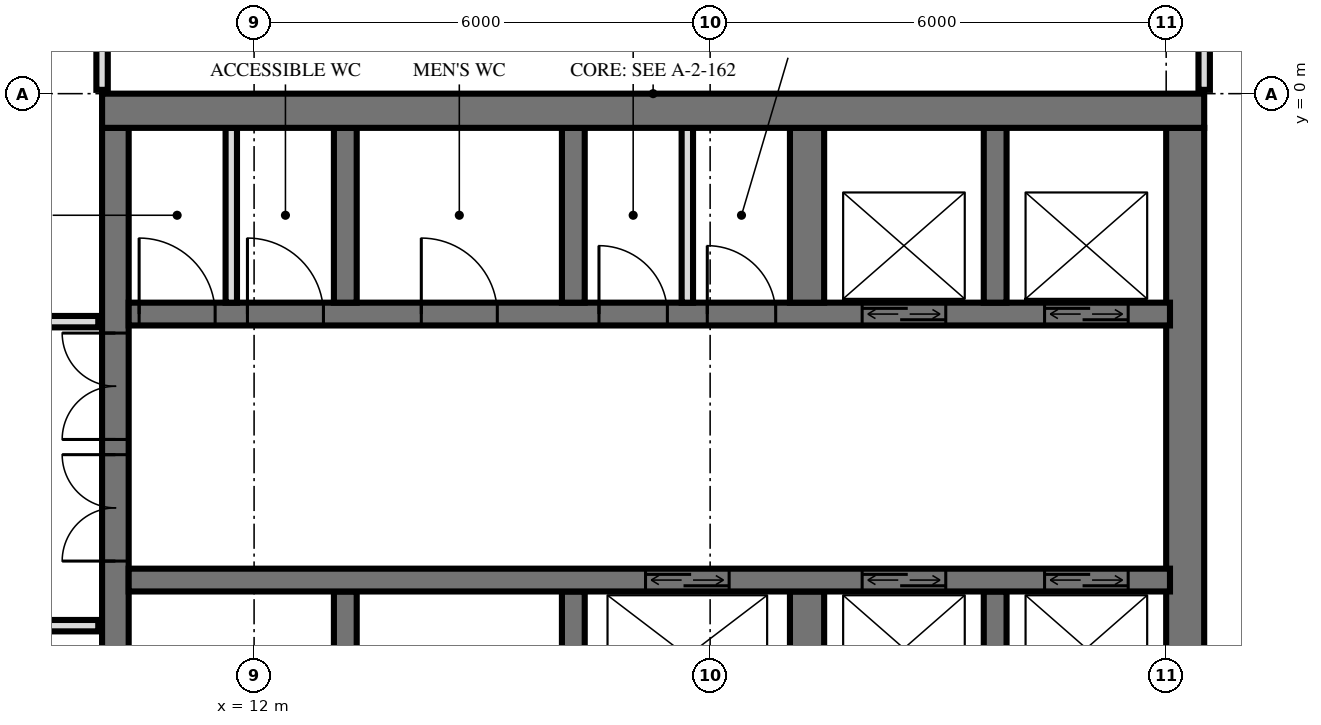
"""IFC4 building model, lengths in metres.
Left out: names, types, materials, properties, quantities, classifications, styles, units other than length and angle.
Written with IfcOpenShell. Run it as: python <this file> out.ifc"""

import sys

from ifc_helpers import new_model, si_unit, direction, frame, frame_2d, origin, place, context, subcontext, project, spatial, rectangle, extrude, element, fill, save


model = new_model("IFC4")
c1 = context("Model", 3, precision=1e-05, world=origin(), true_north=direction((0.0, 1.0)))
c2 = subcontext(c1, "Body", "Model", "MODEL_VIEW")
j1 = project(units=[si_unit("LENGTHUNIT", "METRE"), si_unit("PLANEANGLEUNIT", "RADIAN")], contexts=[c1])
p1 = place(None, origin())
s1 = spatial("IfcSite", under=j1, at=p1, CompositionType="ELEMENT")
p2 = place(p1, origin())
s2 = spatial("IfcBuilding", under=s1, at=p2, CompositionType="ELEMENT")
p3 = place(p2, frame((0.0, 0.0, 106.8)))
s3 = spatial("IfcBuildingStorey", under=s2, at=p3, CompositionType="ELEMENT", Elevation=106.8)
p4 = place(p3, frame((10.0, -0.225, 0.0), z_axis=(0.0, 0.0, 1.0), x_axis=(1.0, 0.0, 0.0)))
e1 = element("IfcWall", 1, at=p4, inside=s3, PredefinedType="SHEAR", context=c2, shape_type="SweptSolid", body=[
    extrude(rectangle(XDim=14.5, YDim=0.45, at=frame_2d((7.25, 0.0))), origin(), (0.0, 0.0, 1.0), 6.0),
])
p5 = place(p3, frame((10.175, -14.55, 0.0), z_axis=(0.0, 0.0, 1.0), x_axis=(0.0, 1.0, 0.0)))
e2 = element("IfcWall", 2, at=p5, inside=s3, PredefinedType="SHEAR", context=c2, shape_type="SweptSolid", body=[
    extrude(rectangle(XDim=14.1, YDim=0.35, at=frame_2d((7.05, 0.0))), origin(), (0.0, 0.0, 1.0), 6.0),
])
p6 = place(p5, frame((8.4, 0.0, 0.0)))
e3 = element("IfcOpeningElement", 3, at=p6, cuts=e2, PredefinedType="OPENING", context=c2, shape_type="SweptSolid", body=[
    extrude(rectangle(XDim=1.4, YDim=2.4, at=frame_2d((0.7, 1.2))), frame((0.0, 0.185, 0.0), z_axis=(0.0, -1.0, 0.0), x_axis=(1.0, 0.0, 0.0)), (0.0, 0.0, 1.0), 0.37),
])
p7 = place(p5, frame((10.0, 0.0, 0.0)))
e4 = element("IfcOpeningElement", 4, at=p7, cuts=e2, PredefinedType="OPENING", context=c2, shape_type="SweptSolid", body=[
    extrude(rectangle(XDim=1.4, YDim=2.4, at=frame_2d((0.7, 1.2))), frame((0.0, 0.185, 0.0), z_axis=(0.0, -1.0, 0.0), x_axis=(1.0, 0.0, 0.0)), (0.0, 0.0, 1.0), 0.37),
])
p8 = place(p5, frame((4.0, 0.0, 0.0)))
e5 = element("IfcOpeningElement", 5, at=p8, cuts=e2, PredefinedType="OPENING", context=c2, shape_type="SweptSolid", body=[
    extrude(rectangle(XDim=1.2, YDim=2.1, at=frame_2d((0.6, 1.05))), frame((0.0, 0.185, 0.0), z_axis=(0.0, -1.0, 0.0), x_axis=(1.0, 0.0, 0.0)), (0.0, 0.0, 1.0), 0.37),
])
p9 = place(p3, frame((24.25, -14.55, 0.0), z_axis=(0.0, 0.0, 1.0), x_axis=(0.0, 1.0, 0.0)))
e6 = element("IfcWall", 6, at=p9, inside=s3, PredefinedType="SHEAR", context=c2, shape_type="SweptSolid", body=[
    extrude(rectangle(XDim=14.1, YDim=0.5, at=frame_2d((7.05, 0.0))), origin(), (0.0, 0.0, 1.0), 6.0),
])
p10 = place(p3, frame((10.35, -2.9, 0.0), z_axis=(0.0, 0.0, 1.0), x_axis=(1.0, 0.0, 0.0)))
e7 = element("IfcWall", 7, at=p10, inside=s3, PredefinedType="SHEAR", context=c2, shape_type="SweptSolid", body=[
    extrude(rectangle(XDim=13.7, YDim=0.3, at=frame_2d((6.85, 0.0))), origin(), (0.0, 0.0, 1.0), 6.0),
])
p11 = place(p10, frame((9.65, 0.0, 0.0)))
e8 = element("IfcOpeningElement", 8, at=p11, cuts=e7, PredefinedType="OPENING", context=c2, shape_type="SweptSolid", body=[
    extrude(rectangle(XDim=1.1, YDim=2.1, at=frame_2d((0.55, 1.05))), frame((0.0, 0.16, 0.0), z_axis=(0.0, -1.0, 0.0), x_axis=(1.0, 0.0, 0.0)), (0.0, 0.0, 1.0), 0.32),
])
p12 = place(p10, frame((12.05, 0.0, 0.0)))
e9 = element("IfcOpeningElement", 9, at=p12, cuts=e7, PredefinedType="OPENING", context=c2, shape_type="SweptSolid", body=[
    extrude(rectangle(XDim=1.1, YDim=2.1, at=frame_2d((0.55, 1.05))), frame((0.0, 0.16, 0.0), z_axis=(0.0, -1.0, 0.0), x_axis=(1.0, 0.0, 0.0)), (0.0, 0.0, 1.0), 0.32),
])
p13 = place(p10, frame((6.188, 0.0, 0.0)))
e10 = element("IfcOpeningElement", 10, at=p13, cuts=e7, PredefinedType="OPENING", context=c2, shape_type="SweptSolid", body=[
    extrude(rectangle(XDim=0.9, YDim=2.1, at=frame_2d((0.45, 1.05))), frame((0.0, 0.16, 0.0), z_axis=(0.0, -1.0, 0.0), x_axis=(1.0, 0.0, 0.0)), (0.0, 0.0, 1.0), 0.32),
])
p14 = place(p10, frame((7.613, 0.0, 0.0)))
e11 = element("IfcOpeningElement", 11, at=p14, cuts=e7, PredefinedType="OPENING", context=c2, shape_type="SweptSolid", body=[
    extrude(rectangle(XDim=0.9, YDim=2.1, at=frame_2d((0.45, 1.05))), frame((0.0, 0.16, 0.0), z_axis=(0.0, -1.0, 0.0), x_axis=(1.0, 0.0, 0.0)), (0.0, 0.0, 1.0), 0.32),
])
p15 = place(p10, frame((0.137, 0.0, 0.0)))
e12 = element("IfcOpeningElement", 12, at=p15, cuts=e7, PredefinedType="OPENING", context=c2, shape_type="SweptSolid", body=[
    extrude(rectangle(XDim=1.0, YDim=2.1, at=frame_2d((0.5, 1.05))), frame((0.0, 0.16, 0.0), z_axis=(0.0, -1.0, 0.0), x_axis=(1.0, 0.0, 0.0)), (0.0, 0.0, 1.0), 0.32),
])
p16 = place(p10, frame((1.562, 0.0, 0.0)))
e13 = element("IfcOpeningElement", 13, at=p16, cuts=e7, PredefinedType="OPENING", context=c2, shape_type="SweptSolid", body=[
    extrude(rectangle(XDim=1.0, YDim=2.1, at=frame_2d((0.5, 1.05))), frame((0.0, 0.16, 0.0), z_axis=(0.0, -1.0, 0.0), x_axis=(1.0, 0.0, 0.0)), (0.0, 0.0, 1.0), 0.32),
])
p17 = place(p10, frame((3.85, 0.0, 0.0)))
e14 = element("IfcOpeningElement", 14, at=p17, cuts=e7, PredefinedType="OPENING", context=c2, shape_type="SweptSolid", body=[
    extrude(rectangle(XDim=1.0, YDim=2.1, at=frame_2d((0.5, 1.05))), frame((0.0, 0.16, 0.0), z_axis=(0.0, -1.0, 0.0), x_axis=(1.0, 0.0, 0.0)), (0.0, 0.0, 1.0), 0.32),
])
p18 = place(p3, frame((10.35, -6.4, 0.0), z_axis=(0.0, 0.0, 1.0), x_axis=(1.0, 0.0, 0.0)))
e15 = element("IfcWall", 15, at=p18, inside=s3, PredefinedType="SHEAR", context=c2, shape_type="SweptSolid", body=[
    extrude(rectangle(XDim=13.7, YDim=0.3, at=frame_2d((6.85, 0.0))), origin(), (0.0, 0.0, 1.0), 6.0),
])
p19 = place(p18, frame((9.65, 0.0, 0.0)))
e16 = element("IfcOpeningElement", 16, at=p19, cuts=e15, PredefinedType="OPENING", context=c2, shape_type="SweptSolid", body=[
    extrude(rectangle(XDim=1.1, YDim=2.1, at=frame_2d((0.55, 1.05))), frame((0.0, 0.16, 0.0), z_axis=(0.0, -1.0, 0.0), x_axis=(1.0, 0.0, 0.0)), (0.0, 0.0, 1.0), 0.32),
])
p20 = place(p18, frame((12.05, 0.0, 0.0)))
e17 = element("IfcOpeningElement", 17, at=p20, cuts=e15, PredefinedType="OPENING", context=c2, shape_type="SweptSolid", body=[
    extrude(rectangle(XDim=1.1, YDim=2.1, at=frame_2d((0.55, 1.05))), frame((0.0, 0.16, 0.0), z_axis=(0.0, -1.0, 0.0), x_axis=(1.0, 0.0, 0.0)), (0.0, 0.0, 1.0), 0.32),
])
p21 = place(p18, frame((6.8, 0.0, 0.0)))
e18 = element("IfcOpeningElement", 18, at=p21, cuts=e15, PredefinedType="OPENING", context=c2, shape_type="SweptSolid", body=[
    extrude(rectangle(XDim=1.1, YDim=2.1, at=frame_2d((0.55, 1.05))), frame((0.0, 0.16, 0.0), z_axis=(0.0, -1.0, 0.0), x_axis=(1.0, 0.0, 0.0)), (0.0, 0.0, 1.0), 0.32),
])
for number, where, z_axis, x_axis in (
    (19, (13.2, -2.75, 0.0), (0.0, 0.0, 1.0), (0.0, 1.0, 0.0)),
    (20, (13.2, -8.85, 0.0), (0.0, 0.0, 1.0), (0.0, 1.0, 0.0)),
    (21, (16.2, -2.75, 0.0), (0.0, 0.0, 1.0), (0.0, 1.0, 0.0)),
    (22, (16.2, -8.85, 0.0), (0.0, 0.0, 1.0), (0.0, 1.0, 0.0)),
):
    element("IfcWall", number, at=place(p3, frame(where, z_axis=z_axis, x_axis=x_axis)), inside=s3, PredefinedType="SHEAR", context=c2, shape_type="SweptSolid", body=[
        extrude(rectangle(XDim=2.3, YDim=0.3, at=frame_2d((1.15, 0.0))), origin(), (0.0, 0.0, 1.0), 6.0),
    ])
for number, where, z_axis, x_axis in (
    (23, (19.275, -2.75, 0.0), (0.0, 0.0, 1.0), (0.0, 1.0, 0.0)),
    (24, (19.275, -8.85, 0.0), (0.0, 0.0, 1.0), (0.0, 1.0, 0.0)),
):
    element("IfcWall", number, at=place(p3, frame(where, z_axis=z_axis, x_axis=x_axis)), inside=s3, PredefinedType="SHEAR", context=c2, shape_type="SweptSolid", body=[
        extrude(rectangle(XDim=2.3, YDim=0.45, at=frame_2d((1.15, 0.0))), origin(), (0.0, 0.0, 1.0), 6.0),
    ])
for number, where, z_axis, x_axis in (
    (25, (21.75, -2.75, 0.0), (0.0, 0.0, 1.0), (0.0, 1.0, 0.0)),
    (26, (21.75, -8.85, 0.0), (0.0, 0.0, 1.0), (0.0, 1.0, 0.0)),
):
    element("IfcWall", number, at=place(p3, frame(where, z_axis=z_axis, x_axis=x_axis)), inside=s3, PredefinedType="SHEAR", context=c2, shape_type="SweptSolid", body=[
        extrude(rectangle(XDim=2.3, YDim=0.3, at=frame_2d((1.15, 0.0))), origin(), (0.0, 0.0, 1.0), 6.0),
    ])
for number, where, z_axis, x_axis in (
    (27, (17.7, -2.75, 0.0), (0.0, 0.0, 1.0), (0.0, 1.0, 0.0)),
    (28, (11.7, -2.75, 0.0), (0.0, 0.0, 1.0), (0.0, 1.0, 0.0)),
):
    element("IfcWall", number, at=place(p3, frame(where, z_axis=z_axis, x_axis=x_axis)), inside=s3, PredefinedType="PARTITIONING", context=c2, shape_type="SweptSolid", body=[
        extrude(rectangle(XDim=2.3, YDim=0.15, at=frame_2d((1.15, 0.0))), origin(), (0.0, 0.0, 1.0), 5.7),
    ])
p22 = place(p3, frame((24.5, 0.05, 0.0), z_axis=(0.0, 0.0, 1.0), x_axis=(0.0, 1.0, 0.0)))
e29 = element("IfcWall", 29, at=p22, inside=s3, PredefinedType="PARTITIONING", context=c2, shape_type="SweptSolid", body=[
    extrude(rectangle(XDim=0.807, YDim=0.15, at=frame_2d((0.404, 0.0))), origin(), (0.0, 0.0, 1.0), 5.7),
])
p23 = place(p3, frame((10.0, 0.05, 0.0), z_axis=(0.0, 0.0, 1.0), x_axis=(0.0, 1.0, 0.0)))
e30 = element("IfcWall", 30, at=p23, inside=s3, PredefinedType="PARTITIONING", context=c2, shape_type="SweptSolid", body=[
    extrude(rectangle(XDim=0.91, YDim=0.15, at=frame_2d((0.455, 0.0))), origin(), (0.0, 0.0, 1.0), 5.7),
])
p24 = place(p3, frame((-9.95, -7.0, 0.0), z_axis=(0.0, 0.0, 1.0), x_axis=(1.0, 0.0, 0.0)))
e31 = element("IfcWall", 31, at=p24, inside=s3, PredefinedType="PARTITIONING", context=c2, shape_type="SweptSolid", body=[
    extrude(rectangle(XDim=19.9, YDim=0.15, at=frame_2d((9.95, 0.0))), origin(), (0.0, 0.0, 1.0), 5.7),
])
p25 = place(p24, frame((9.45, 0.0, 0.0)))
e32 = element("IfcOpeningElement", 32, at=p25, cuts=e31, PredefinedType="OPENING", context=c2, shape_type="SweptSolid", body=[
    extrude(rectangle(XDim=1.0, YDim=2.1, at=frame_2d((0.5, 1.05))), frame((0.0, 0.085, 0.0), z_axis=(0.0, -1.0, 0.0), x_axis=(1.0, 0.0, 0.0)), (0.0, 0.0, 1.0), 0.17),
])
p26 = place(p24, frame((2.0, 0.0, 0.0)))
e33 = element("IfcOpeningElement", 33, at=p26, cuts=e31, PredefinedType="OPENING", context=c2, shape_type="SweptSolid", body=[
    extrude(rectangle(XDim=1.0, YDim=2.1, at=frame_2d((0.5, 1.05))), frame((0.0, 0.085, 0.0), z_axis=(0.0, -1.0, 0.0), x_axis=(1.0, 0.0, 0.0)), (0.0, 0.0, 1.0), 0.17),
])
p27 = place(p3, frame((-9.95, -3.0, 0.0), z_axis=(0.0, 0.0, 1.0), x_axis=(1.0, 0.0, 0.0)))
e34 = element("IfcWall", 34, at=p27, inside=s3, PredefinedType="PARTITIONING", context=c2, shape_type="SweptSolid", body=[
    extrude(rectangle(XDim=19.9, YDim=0.15, at=frame_2d((9.95, 0.0))), origin(), (0.0, 0.0, 1.0), 5.7),
])
p28 = place(p27, frame((0.95, 0.0, 0.0)))
e35 = element("IfcOpeningElement", 35, at=p28, cuts=e34, PredefinedType="OPENING", context=c2, shape_type="SweptSolid", body=[
    extrude(rectangle(XDim=1.0, YDim=2.1, at=frame_2d((0.5, 1.05))), frame((0.0, 0.085, 0.0), z_axis=(0.0, -1.0, 0.0), x_axis=(1.0, 0.0, 0.0)), (0.0, 0.0, 1.0), 0.17),
])
p29 = place(p27, frame((3.7, 0.0, 0.0)))
e36 = element("IfcOpeningElement", 36, at=p29, cuts=e34, PredefinedType="OPENING", context=c2, shape_type="SweptSolid", body=[
    extrude(rectangle(XDim=1.0, YDim=2.1, at=frame_2d((0.5, 1.05))), frame((0.0, 0.085, 0.0), z_axis=(0.0, -1.0, 0.0), x_axis=(1.0, 0.0, 0.0)), (0.0, 0.0, 1.0), 0.17),
])
p30 = place(p27, frame((7.0, 0.0, 0.0)))
e37 = element("IfcOpeningElement", 37, at=p30, cuts=e34, PredefinedType="OPENING", context=c2, shape_type="SweptSolid", body=[
    extrude(rectangle(XDim=1.0, YDim=2.1, at=frame_2d((0.5, 1.05))), frame((0.0, 0.085, 0.0), z_axis=(0.0, -1.0, 0.0), x_axis=(1.0, 0.0, 0.0)), (0.0, 0.0, 1.0), 0.17),
])
p31 = place(p27, frame((16.9, 0.0, 0.0)))
e38 = element("IfcOpeningElement", 38, at=p31, cuts=e34, PredefinedType="OPENING", context=c2, shape_type="SweptSolid", body=[
    extrude(rectangle(XDim=1.0, YDim=2.1, at=frame_2d((0.5, 1.05))), frame((0.0, 0.085, 0.0), z_axis=(0.0, -1.0, 0.0), x_axis=(1.0, 0.0, 0.0)), (0.0, 0.0, 1.0), 0.17),
])
p32 = place(p11, origin())
e39 = element("IfcDoor", 39, at=p32, inside=s3, OperationType="DOUBLE_DOOR_SLIDING", PredefinedType="USERDEFINED", context=c2, shape_type="SweptSolid", body=[
    extrude(rectangle(XDim=1.1, YDim=2.1, at=frame_2d((0.55, 1.05))), frame((0.0, 0.025, 0.0), z_axis=(0.0, -1.0, 0.0), x_axis=(1.0, 0.0, 0.0)), (0.0, 0.0, 1.0), 0.05),
])
fill(e8, e39)
p33 = place(p19, origin())
e40 = element("IfcDoor", 40, at=p33, inside=s3, OperationType="DOUBLE_DOOR_SLIDING", PredefinedType="USERDEFINED", context=c2, shape_type="SweptSolid", body=[
    extrude(rectangle(XDim=1.1, YDim=2.1, at=frame_2d((0.55, 1.05))), frame((0.0, 0.025, 0.0), z_axis=(0.0, -1.0, 0.0), x_axis=(1.0, 0.0, 0.0)), (0.0, 0.0, 1.0), 0.05),
])
fill(e16, e40)
p34 = place(p12, origin())
e41 = element("IfcDoor", 41, at=p34, inside=s3, OperationType="DOUBLE_DOOR_SLIDING", PredefinedType="USERDEFINED", context=c2, shape_type="SweptSolid", body=[
    extrude(rectangle(XDim=1.1, YDim=2.1, at=frame_2d((0.55, 1.05))), frame((0.0, 0.025, 0.0), z_axis=(0.0, -1.0, 0.0), x_axis=(1.0, 0.0, 0.0)), (0.0, 0.0, 1.0), 0.05),
])
fill(e9, e41)
p35 = place(p20, origin())
e42 = element("IfcDoor", 42, at=p35, inside=s3, OperationType="DOUBLE_DOOR_SLIDING", PredefinedType="USERDEFINED", context=c2, shape_type="SweptSolid", body=[
    extrude(rectangle(XDim=1.1, YDim=2.1, at=frame_2d((0.55, 1.05))), frame((0.0, 0.025, 0.0), z_axis=(0.0, -1.0, 0.0), x_axis=(1.0, 0.0, 0.0)), (0.0, 0.0, 1.0), 0.05),
])
fill(e17, e42)
p36 = place(p21, origin())
e43 = element("IfcDoor", 43, at=p36, inside=s3, OperationType="DOUBLE_DOOR_SLIDING", PredefinedType="USERDEFINED", context=c2, shape_type="SweptSolid", body=[
    extrude(rectangle(XDim=1.1, YDim=2.1, at=frame_2d((0.55, 1.05))), frame((0.0, 0.025, 0.0), z_axis=(0.0, -1.0, 0.0), x_axis=(1.0, 0.0, 0.0)), (0.0, 0.0, 1.0), 0.05),
])
fill(e18, e43)
p37 = place(p6, origin())
e44 = element("IfcDoor", 44, at=p37, inside=s3, OperationType="DOUBLE_DOOR_SINGLE_SWING", PredefinedType="DOOR", context=c2, shape_type="SweptSolid", body=[
    extrude(rectangle(XDim=1.4, YDim=2.4, at=frame_2d((0.7, 1.2))), frame((0.0, 0.025, 0.0), z_axis=(0.0, -1.0, 0.0), x_axis=(1.0, 0.0, 0.0)), (0.0, 0.0, 1.0), 0.05),
])
fill(e3, e44)
p38 = place(p7, origin())
e45 = element("IfcDoor", 45, at=p38, inside=s3, OperationType="DOUBLE_DOOR_SINGLE_SWING", PredefinedType="DOOR", context=c2, shape_type="SweptSolid", body=[
    extrude(rectangle(XDim=1.4, YDim=2.4, at=frame_2d((0.7, 1.2))), frame((0.0, 0.025, 0.0), z_axis=(0.0, -1.0, 0.0), x_axis=(1.0, 0.0, 0.0)), (0.0, 0.0, 1.0), 0.05),
])
fill(e4, e45)
p39 = place(p13, origin())
e46 = element("IfcDoor", 46, at=p39, inside=s3, OperationType="SINGLE_SWING_RIGHT", PredefinedType="DOOR", context=c2, shape_type="SweptSolid", body=[
    extrude(rectangle(XDim=0.9, YDim=2.1, at=frame_2d((0.45, 1.05))), frame((0.0, 0.025, 0.0), z_axis=(0.0, -1.0, 0.0), x_axis=(1.0, 0.0, 0.0)), (0.0, 0.0, 1.0), 0.05),
])
fill(e10, e46)
p40 = place(p14, origin())
e47 = element("IfcDoor", 47, at=p40, inside=s3, OperationType="SINGLE_SWING_RIGHT", PredefinedType="DOOR", context=c2, shape_type="SweptSolid", body=[
    extrude(rectangle(XDim=0.9, YDim=2.1, at=frame_2d((0.45, 1.05))), frame((0.0, 0.025, 0.0), z_axis=(0.0, -1.0, 0.0), x_axis=(1.0, 0.0, 0.0)), (0.0, 0.0, 1.0), 0.05),
])
fill(e11, e47)
p41 = place(p15, origin())
e48 = element("IfcDoor", 48, at=p41, inside=s3, OperationType="SINGLE_SWING_RIGHT", PredefinedType="DOOR", context=c2, shape_type="SweptSolid", body=[
    extrude(rectangle(XDim=1.0, YDim=2.1, at=frame_2d((0.5, 1.05))), frame((0.0, 0.025, 0.0), z_axis=(0.0, -1.0, 0.0), x_axis=(1.0, 0.0, 0.0)), (0.0, 0.0, 1.0), 0.05),
])
fill(e12, e48)
p42 = place(p16, origin())
e49 = element("IfcDoor", 49, at=p42, inside=s3, OperationType="SINGLE_SWING_RIGHT", PredefinedType="DOOR", context=c2, shape_type="SweptSolid", body=[
    extrude(rectangle(XDim=1.0, YDim=2.1, at=frame_2d((0.5, 1.05))), frame((0.0, 0.025, 0.0), z_axis=(0.0, -1.0, 0.0), x_axis=(1.0, 0.0, 0.0)), (0.0, 0.0, 1.0), 0.05),
])
fill(e13, e49)
p43 = place(p17, origin())
e50 = element("IfcDoor", 50, at=p43, inside=s3, OperationType="SINGLE_SWING_RIGHT", PredefinedType="DOOR", context=c2, shape_type="SweptSolid", body=[
    extrude(rectangle(XDim=1.0, YDim=2.1, at=frame_2d((0.5, 1.05))), frame((0.0, 0.025, 0.0), z_axis=(0.0, -1.0, 0.0), x_axis=(1.0, 0.0, 0.0)), (0.0, 0.0, 1.0), 0.05),
])
fill(e14, e50)
save(model, sys.argv[1])
